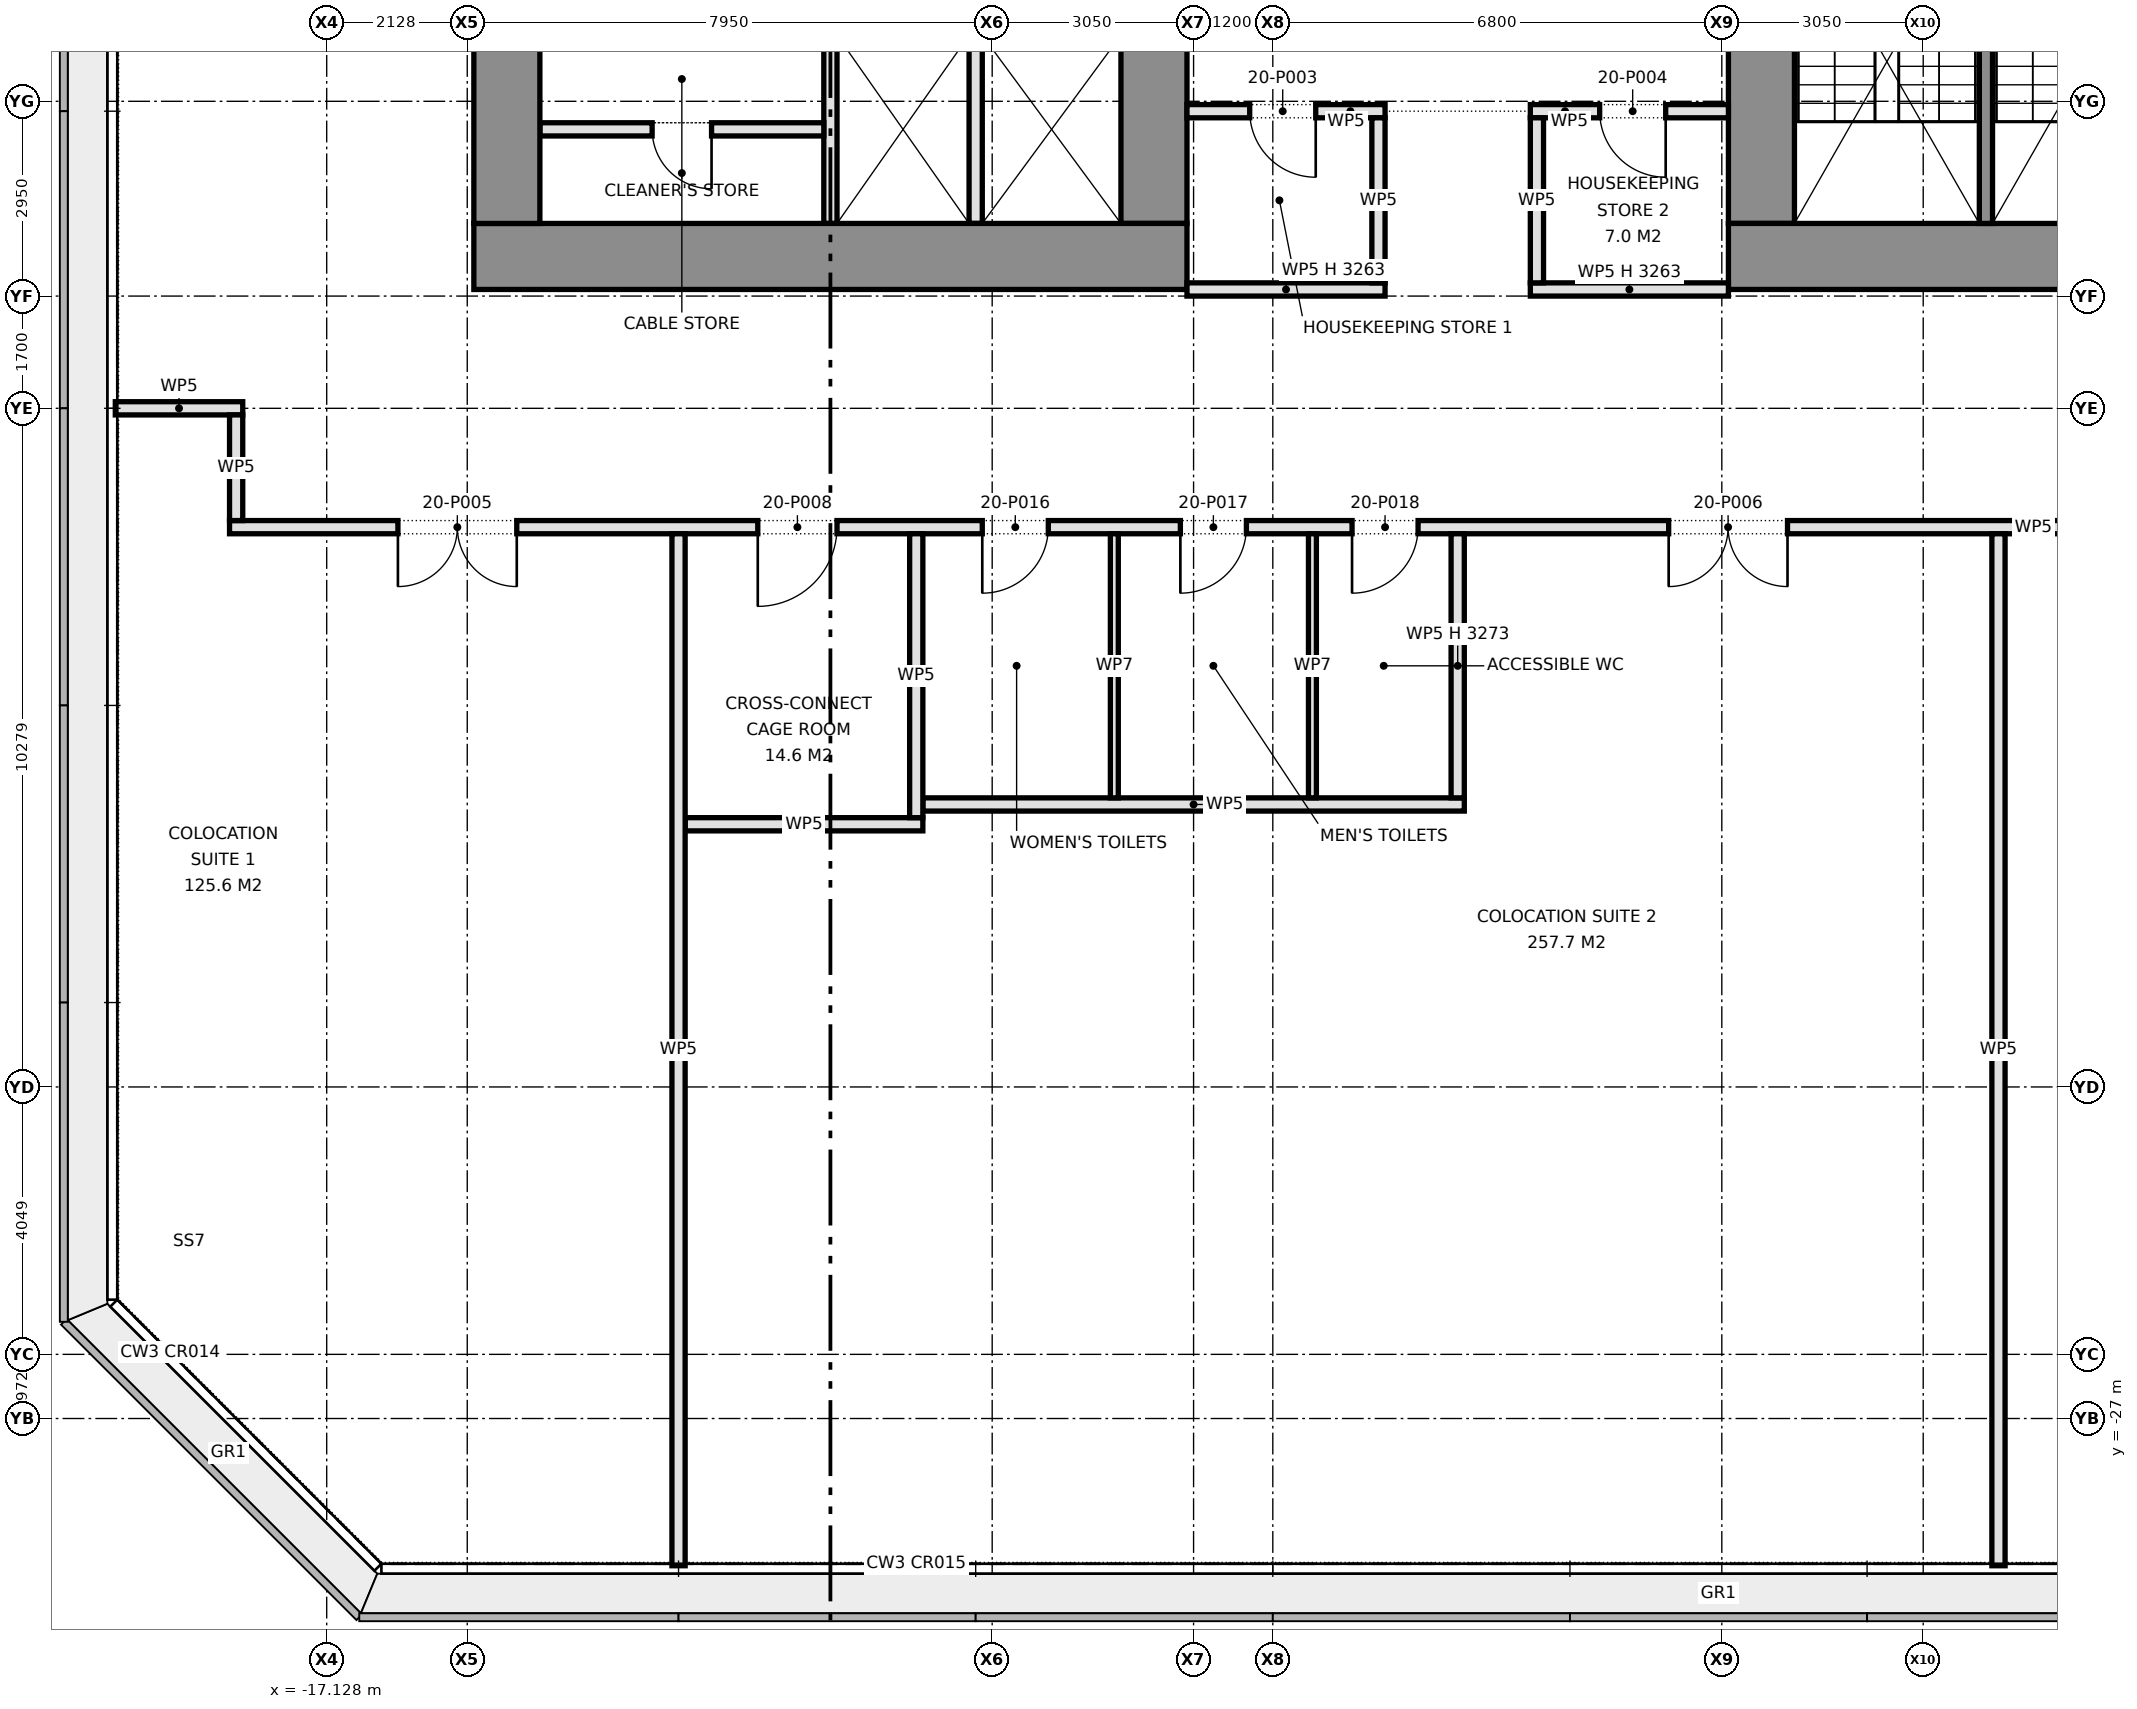
"""IFC4 building model, lengths in metres.
Left out: names, types, materials, properties, quantities, classifications, styles, units other than length and angle.
Written with IfcOpenShell. Run it as: python <this file> out.ifc"""

import sys

from ifc_helpers import new_model, si_unit, direction, frame, frame_2d, origin, place, context, subcontext, project, spatial, rectangle, extrude, element, fill, save


model = new_model("IFC4")
c1 = context("Model", 3, precision=1e-05, world=origin(), true_north=direction((0.0, 1.0)))
c2 = subcontext(c1, "Body", "Model", "MODEL_VIEW")
j1 = project(units=[si_unit("LENGTHUNIT", "METRE"), si_unit("PLANEANGLEUNIT", "RADIAN")], contexts=[c1])
p1 = place(None, origin())
s1 = spatial("IfcSite", under=j1, at=p1, CompositionType="ELEMENT")
p2 = place(p1, origin())
s2 = spatial("IfcBuilding", under=s1, at=p2, CompositionType="ELEMENT")
p3 = place(p2, frame((0.0, 0.0, 90.8)))
s3 = spatial("IfcBuildingStorey", under=s2, at=p3, CompositionType="ELEMENT", Elevation=90.8)
p4 = place(p3, frame((-14.9, -9.4, 0.0), z_axis=(0.0, 0.0, 1.0), x_axis=(1.0, 0.0, 0.0)))
e1 = element("IfcWall", 1, at=p4, inside=s3, PredefinedType="SHEAR", context=c2, shape_type="SweptSolid", body=[
    extrude(rectangle(XDim=10.8, YDim=1.0, at=frame_2d((5.4, 0.0))), origin(), (0.0, 0.0, 1.0), 4.2),
])
for number, where, z_axis, x_axis in (
    (2, (-14.4, -8.9, 0.0), (0.0, 0.0, 1.0), (0.0, 1.0, 0.0)),
    (3, (-4.6, -8.9, 0.0), (0.0, 0.0, 1.0), (0.0, 1.0, 0.0)),
):
    element("IfcWall", number, at=place(p3, frame(where, z_axis=z_axis, x_axis=x_axis)), inside=s3, PredefinedType="SHEAR", context=c2, shape_type="SweptSolid", body=[
        extrude(rectangle(XDim=3.15, YDim=1.0, at=frame_2d((1.575, 0.0))), origin(), (0.0, 0.0, 1.0), 4.2),
    ])
for number, where, z_axis, x_axis in (
    (4, (-9.5, -8.9, 0.0), (0.0, 0.0, 1.0), (0.0, 1.0, 0.0)),
    (5, (-7.3, -8.9, 0.0), (0.0, 0.0, 1.0), (0.0, 1.0, 0.0)),
):
    element("IfcWall", number, at=place(p3, frame(where, z_axis=z_axis, x_axis=x_axis)), inside=s3, PredefinedType="PARTITIONING", context=c2, shape_type="SweptSolid", body=[
        extrude(rectangle(XDim=2.85, YDim=0.2, at=frame_2d((1.425, 0.0))), origin(), (0.0, 0.0, 1.0), 4.2),
    ])
p5 = place(p3, frame((-13.9, -7.475, 0.0), z_axis=(0.0, 0.0, 1.0), x_axis=(1.0, 0.0, 0.0)))
e6 = element("IfcWall", 6, at=p5, inside=s3, PredefinedType="PARTITIONING", context=c2, shape_type="SweptSolid", body=[
    extrude(rectangle(XDim=4.3, YDim=0.2, at=frame_2d((2.15, 0.0))), origin(), (0.0, 0.0, 1.0), 4.2),
])
p6 = place(p5, frame((1.7, 0.0, 0.0)))
e7 = element("IfcOpeningElement", 7, at=p6, cuts=e6, PredefinedType="OPENING", context=c2, shape_type="SweptSolid", body=[
    extrude(rectangle(XDim=0.9, YDim=2.1, at=frame_2d((0.45, 1.05))), frame((0.0, 0.11, 0.0), z_axis=(0.0, -1.0, 0.0), x_axis=(1.0, 0.0, 0.0)), (0.0, 0.0, 1.0), 0.22),
])
p7 = place(p3, frame((14.9, -9.4, 0.0), z_axis=(0.0, 0.0, 1.0), x_axis=(-1.0, 0.0, 0.0)))
e8 = element("IfcWall", 8, at=p7, inside=s3, PredefinedType="SHEAR", context=c2, shape_type="SweptSolid", body=[
    extrude(rectangle(XDim=10.8, YDim=1.0, at=frame_2d((5.4, 0.0))), origin(), (0.0, 0.0, 1.0), 4.2),
])
p8 = place(p3, frame((4.6, -1.55, 0.0), z_axis=(0.0, 0.0, 1.0), x_axis=(0.0, -1.0, 0.0)))
e9 = element("IfcWall", 9, at=p8, inside=s3, PredefinedType="SHEAR", context=c2, shape_type="SweptSolid", body=[
    extrude(rectangle(XDim=7.35, YDim=1.0, at=frame_2d((3.675, 0.0))), origin(), (0.0, 0.0, 1.0), 4.2),
])
p9 = place(p3, frame((8.0, -2.38, 0.0), z_axis=(0.0, 0.0, 1.0), x_axis=(0.0, -1.0, 0.0)))
e10 = element("IfcWall", 10, at=p9, inside=s3, PredefinedType="SHEAR", context=c2, shape_type="SweptSolid", body=[
    extrude(rectangle(XDim=6.52, YDim=0.2, at=frame_2d((3.26, 0.0))), origin(), (0.0, 0.0, 1.0), 4.2),
])
p10 = place(p3, frame((-11.7, -18.0, 0.0), z_axis=(0.0, 0.0, 1.0), x_axis=(1.0, 0.0, 0.0)))
e11 = element("IfcWall", 11, at=p10, inside=s3, PredefinedType="PARTITIONING", context=c2, shape_type="SweptSolid", body=[
    extrude(rectangle(XDim=3.6, YDim=0.2, at=frame_2d((1.8, 0.0))), origin(), (0.0, 0.0, 1.0), 4.2),
])
p11 = place(p3, frame((-8.1, -17.7, 0.0), z_axis=(0.0, 0.0, 1.0), x_axis=(1.0, 0.0, 0.0)))
e12 = element("IfcWall", 12, at=p11, inside=s3, PredefinedType="PARTITIONING", context=c2, shape_type="SweptSolid", body=[
    extrude(rectangle(XDim=8.2, YDim=0.2, at=frame_2d((4.1, 0.0))), origin(), (0.0, 0.0, 1.0), 4.2),
])
p12 = place(p3, frame((-18.6, -13.5, 0.0), z_axis=(0.0, 0.0, 1.0), x_axis=(1.0, 0.0, 0.0)))
e13 = element("IfcWall", 13, at=p12, inside=s3, PredefinedType="PARTITIONING", context=c2, shape_type="SweptSolid", body=[
    extrude(rectangle(XDim=37.2, YDim=0.2, at=frame_2d((18.6, 0.0))), origin(), (0.0, 0.0, 1.0), 4.2),
])
p13 = place(p12, frame((2.55, 0.0, 0.0)))
e14 = element("IfcOpeningElement", 14, at=p13, cuts=e13, PredefinedType="OPENING", context=c2, shape_type="SweptSolid", body=[
    extrude(rectangle(XDim=1.8, YDim=2.1, at=frame_2d((0.9, 1.05))), frame((0.0, 0.11, 0.0), z_axis=(0.0, -1.0, 0.0), x_axis=(1.0, 0.0, 0.0)), (0.0, 0.0, 1.0), 0.22),
])
p14 = place(p12, frame((21.795, 0.0, 0.0)))
e15 = element("IfcOpeningElement", 15, at=p14, cuts=e13, PredefinedType="OPENING", context=c2, shape_type="SweptSolid", body=[
    extrude(rectangle(XDim=1.8, YDim=2.1, at=frame_2d((0.9, 1.05))), frame((0.0, 0.11, 0.0), z_axis=(0.0, -1.0, 0.0), x_axis=(1.0, 0.0, 0.0)), (0.0, 0.0, 1.0), 0.22),
])
p15 = place(p12, frame((31.045, 0.0, 0.0)))
e16 = element("IfcOpeningElement", 16, at=p15, cuts=e13, PredefinedType="OPENING", context=c2, shape_type="SweptSolid", body=[
    extrude(rectangle(XDim=1.8, YDim=2.1, at=frame_2d((0.9, 1.05))), frame((0.0, 0.11, 0.0), z_axis=(0.0, -1.0, 0.0), x_axis=(1.0, 0.0, 0.0)), (0.0, 0.0, 1.0), 0.22),
])
p16 = place(p12, frame((8.0, 0.0, 0.0)))
e17 = element("IfcOpeningElement", 17, at=p16, cuts=e13, PredefinedType="OPENING", context=c2, shape_type="SweptSolid", body=[
    extrude(rectangle(XDim=1.2, YDim=2.1, at=frame_2d((0.6, 1.05))), frame((0.0, 0.11, 0.0), z_axis=(0.0, -1.0, 0.0), x_axis=(1.0, 0.0, 0.0)), (0.0, 0.0, 1.0), 0.22),
])
p17 = place(p12, frame((11.4, 0.0, 0.0)))
e18 = element("IfcOpeningElement", 18, at=p17, cuts=e13, PredefinedType="OPENING", context=c2, shape_type="SweptSolid", body=[
    extrude(rectangle(XDim=1.0, YDim=2.1, at=frame_2d((0.5, 1.05))), frame((0.0, 0.11, 0.0), z_axis=(0.0, -1.0, 0.0), x_axis=(1.0, 0.0, 0.0)), (0.0, 0.0, 1.0), 0.22),
])
p18 = place(p12, frame((14.4, 0.0, 0.0)))
e19 = element("IfcOpeningElement", 19, at=p18, cuts=e13, PredefinedType="OPENING", context=c2, shape_type="SweptSolid", body=[
    extrude(rectangle(XDim=1.0, YDim=2.1, at=frame_2d((0.5, 1.05))), frame((0.0, 0.11, 0.0), z_axis=(0.0, -1.0, 0.0), x_axis=(1.0, 0.0, 0.0)), (0.0, 0.0, 1.0), 0.22),
])
p19 = place(p12, frame((17.0, 0.0, 0.0)))
e20 = element("IfcOpeningElement", 20, at=p19, cuts=e13, PredefinedType="OPENING", context=c2, shape_type="SweptSolid", body=[
    extrude(rectangle(XDim=1.0, YDim=2.1, at=frame_2d((0.5, 1.05))), frame((0.0, 0.11, 0.0), z_axis=(0.0, -1.0, 0.0), x_axis=(1.0, 0.0, 0.0)), (0.0, 0.0, 1.0), 0.22),
])
p20 = place(p3, frame((-20.33, -11.7, 0.0), z_axis=(0.0, 0.0, 1.0), x_axis=(1.0, 0.0, 0.0)))
e21 = element("IfcWall", 21, at=p20, inside=s3, PredefinedType="PARTITIONING", context=c2, shape_type="SweptSolid", body=[
    extrude(rectangle(XDim=1.93, YDim=0.2, at=frame_2d((0.965, 0.0))), origin(), (0.0, 0.0, 1.0), 4.2),
])
for number, where, z_axis, x_axis in (
    (22, (-4.1, -9.9, 0.0), (0.0, 0.0, 1.0), (1.0, 0.0, 0.0)),
    (23, (1.1, -9.9, 0.0), (0.0, 0.0, 1.0), (1.0, 0.0, 0.0)),
):
    element("IfcWall", number, at=place(p3, frame(where, z_axis=z_axis, x_axis=x_axis)), inside=s3, PredefinedType="PARTITIONING", context=c2, shape_type="SweptSolid", body=[
        extrude(rectangle(XDim=3.0, YDim=0.2, at=frame_2d((1.5, 0.0))), origin(), (0.0, 0.0, 1.0), 3.263),
    ])
p21 = place(p3, frame((-4.1, -7.2, 0.0), z_axis=(0.0, 0.0, 1.0), x_axis=(1.0, 0.0, 0.0)))
e24 = element("IfcWall", 24, at=p21, inside=s3, PredefinedType="PARTITIONING", context=c2, shape_type="SweptSolid", body=[
    extrude(rectangle(XDim=3.0, YDim=0.2, at=frame_2d((1.5, 0.0))), origin(), (0.0, 0.0, 1.0), 4.2),
])
p22 = place(p21, frame((0.95, 0.0, 0.0)))
e25 = element("IfcOpeningElement", 25, at=p22, cuts=e24, PredefinedType="OPENING", context=c2, shape_type="SweptSolid", body=[
    extrude(rectangle(XDim=1.0, YDim=2.1, at=frame_2d((0.5, 1.05))), frame((0.0, 0.11, 0.0), z_axis=(0.0, -1.0, 0.0), x_axis=(1.0, 0.0, 0.0)), (0.0, 0.0, 1.0), 0.22),
])
p23 = place(p3, frame((1.1, -7.2, 0.0), z_axis=(0.0, 0.0, 1.0), x_axis=(1.0, 0.0, 0.0)))
e26 = element("IfcWall", 26, at=p23, inside=s3, PredefinedType="PARTITIONING", context=c2, shape_type="SweptSolid", body=[
    extrude(rectangle(XDim=3.0, YDim=0.2, at=frame_2d((1.5, 0.0))), origin(), (0.0, 0.0, 1.0), 4.2),
])
p24 = place(p23, frame((1.05, 0.0, 0.0)))
e27 = element("IfcOpeningElement", 27, at=p24, cuts=e26, PredefinedType="OPENING", context=c2, shape_type="SweptSolid", body=[
    extrude(rectangle(XDim=1.0, YDim=2.1, at=frame_2d((0.5, 1.05))), frame((0.0, 0.11, 0.0), z_axis=(0.0, -1.0, 0.0), x_axis=(1.0, 0.0, 0.0)), (0.0, 0.0, 1.0), 0.22),
])
p25 = place(p3, frame((8.19, -29.23, 0.0), z_axis=(0.0, 0.0, 1.0), x_axis=(0.0, 1.0, 0.0)))
e28 = element("IfcWall", 28, at=p25, inside=s3, PredefinedType="PARTITIONING", context=c2, shape_type="SweptSolid", body=[
    extrude(rectangle(XDim=15.63, YDim=0.2, at=frame_2d((7.815, 0.0))), origin(), (0.0, 0.0, 1.0), 4.2),
])
p26 = place(p3, frame((1.2, -9.8, 0.0), z_axis=(0.0, 0.0, 1.0), x_axis=(0.0, 1.0, 0.0)))
e29 = element("IfcWall", 29, at=p26, inside=s3, PredefinedType="PARTITIONING", context=c2, shape_type="SweptSolid", body=[
    extrude(rectangle(XDim=2.5, YDim=0.2, at=frame_2d((1.25, 0.0))), origin(), (0.0, 0.0, 1.0), 4.2),
])
p27 = place(p3, frame((0.0, -17.6, 0.0), z_axis=(0.0, 0.0, 1.0), x_axis=(0.0, 1.0, 0.0)))
e30 = element("IfcWall", 30, at=p27, inside=s3, PredefinedType="PARTITIONING", context=c2, shape_type="SweptSolid", body=[
    extrude(rectangle(XDim=4.0, YDim=0.2, at=frame_2d((2.0, 0.0))), origin(), (0.0, 0.0, 1.0), 3.273),
])
p28 = place(p3, frame((-1.2, -9.8, 0.0), z_axis=(0.0, 0.0, 1.0), x_axis=(0.0, 1.0, 0.0)))
e31 = element("IfcWall", 31, at=p28, inside=s3, PredefinedType="PARTITIONING", context=c2, shape_type="SweptSolid", body=[
    extrude(rectangle(XDim=2.5, YDim=0.2, at=frame_2d((1.25, 0.0))), origin(), (0.0, 0.0, 1.0), 4.2),
])
p29 = place(p3, frame((-8.2, -17.9, 0.0), z_axis=(0.0, 0.0, 1.0), x_axis=(0.0, 1.0, 0.0)))
e32 = element("IfcWall", 32, at=p29, inside=s3, PredefinedType="PARTITIONING", context=c2, shape_type="SweptSolid", body=[
    extrude(rectangle(XDim=4.3, YDim=0.2, at=frame_2d((2.15, 0.0))), origin(), (0.0, 0.0, 1.0), 4.2),
])
p30 = place(p3, frame((-11.8, -29.23, 0.0), z_axis=(0.0, 0.0, 1.0), x_axis=(0.0, 1.0, 0.0)))
e33 = element("IfcWall", 33, at=p30, inside=s3, PredefinedType="PARTITIONING", context=c2, shape_type="SweptSolid", body=[
    extrude(rectangle(XDim=15.63, YDim=0.2, at=frame_2d((7.815, 0.0))), origin(), (0.0, 0.0, 1.0), 4.2),
])
p31 = place(p3, frame((-18.5, -13.4, 0.0), z_axis=(0.0, 0.0, 1.0), x_axis=(0.0, 1.0, 0.0)))
e34 = element("IfcWall", 34, at=p31, inside=s3, PredefinedType="PARTITIONING", context=c2, shape_type="SweptSolid", body=[
    extrude(rectangle(XDim=1.6, YDim=0.2, at=frame_2d((0.8, 0.0))), origin(), (0.0, 0.0, 1.0), 4.2),
])
for number, where, z_axis, x_axis in (
    (35, (-2.2, -17.6, 0.0), (0.0, 0.0, 1.0), (0.0, 1.0, 0.0)),
    (36, (-5.2, -17.6, 0.0), (0.0, 0.0, 1.0), (0.0, 1.0, 0.0)),
):
    element("IfcWall", number, at=place(p3, frame(where, z_axis=z_axis, x_axis=x_axis)), inside=s3, PredefinedType="PARTITIONING", context=c2, shape_type="SweptSolid", body=[
        extrude(rectangle(XDim=4.0, YDim=0.12, at=frame_2d((2.0, 0.0))), origin(), (0.0, 0.0, 1.0), 4.2),
    ])
p32 = place(p6, frame((0.9, 0.0, 0.0), z_axis=(0.0, 0.0, 1.0), x_axis=(-1.0, 0.0, 0.0)))
e37 = element("IfcDoor", 37, at=p32, inside=s3, OperationType="SINGLE_SWING_LEFT", PredefinedType="DOOR", context=c2, shape_type="SweptSolid", body=[
    extrude(rectangle(XDim=0.9, YDim=2.1, at=frame_2d((0.45, 1.05))), frame((0.0, 0.025, 0.0), z_axis=(0.0, -1.0, 0.0), x_axis=(1.0, 0.0, 0.0)), (0.0, 0.0, 1.0), 0.05),
])
fill(e7, e37)
p33 = place(p22, frame((1.0, 0.0, 0.0), z_axis=(0.0, 0.0, 1.0), x_axis=(-1.0, 0.0, 0.0)))
e38 = element("IfcDoor", 38, at=p33, inside=s3, OperationType="SINGLE_SWING_LEFT", PredefinedType="DOOR", context=c2, shape_type="SweptSolid", body=[
    extrude(rectangle(XDim=1.0, YDim=2.1, at=frame_2d((0.5, 1.05))), frame((0.0, 0.025, 0.0), z_axis=(0.0, -1.0, 0.0), x_axis=(1.0, 0.0, 0.0)), (0.0, 0.0, 1.0), 0.05),
])
fill(e25, e38)
p34 = place(p24, frame((1.0, 0.0, 0.0), z_axis=(0.0, 0.0, 1.0), x_axis=(-1.0, 0.0, 0.0)))
e39 = element("IfcDoor", 39, at=p34, inside=s3, OperationType="SINGLE_SWING_LEFT", PredefinedType="DOOR", context=c2, shape_type="SweptSolid", body=[
    extrude(rectangle(XDim=1.0, YDim=2.1, at=frame_2d((0.5, 1.05))), frame((0.0, 0.025, 0.0), z_axis=(0.0, -1.0, 0.0), x_axis=(1.0, 0.0, 0.0)), (0.0, 0.0, 1.0), 0.05),
])
fill(e27, e39)
p35 = place(p13, frame((1.8, 0.0, 0.0), z_axis=(0.0, 0.0, 1.0), x_axis=(-1.0, 0.0, 0.0)))
e40 = element("IfcDoor", 40, at=p35, inside=s3, OperationType="DOUBLE_DOOR_SINGLE_SWING", PredefinedType="DOOR", context=c2, shape_type="SweptSolid", body=[
    extrude(rectangle(XDim=1.8, YDim=2.1, at=frame_2d((0.9, 1.05))), frame((0.0, 0.025, 0.0), z_axis=(0.0, -1.0, 0.0), x_axis=(1.0, 0.0, 0.0)), (0.0, 0.0, 1.0), 0.05),
])
fill(e14, e40)
p36 = place(p14, frame((1.8, 0.0, 0.0), z_axis=(0.0, 0.0, 1.0), x_axis=(-1.0, 0.0, 0.0)))
e41 = element("IfcDoor", 41, at=p36, inside=s3, OperationType="DOUBLE_DOOR_SINGLE_SWING", PredefinedType="DOOR", context=c2, shape_type="SweptSolid", body=[
    extrude(rectangle(XDim=1.8, YDim=2.1, at=frame_2d((0.9, 1.05))), frame((0.0, 0.025, 0.0), z_axis=(0.0, -1.0, 0.0), x_axis=(1.0, 0.0, 0.0)), (0.0, 0.0, 1.0), 0.05),
])
fill(e15, e41)
p37 = place(p16, frame((1.2, 0.0, 0.0), z_axis=(0.0, 0.0, 1.0), x_axis=(-1.0, 0.0, 0.0)))
e42 = element("IfcDoor", 42, at=p37, inside=s3, OperationType="SINGLE_SWING_RIGHT", PredefinedType="DOOR", context=c2, shape_type="SweptSolid", body=[
    extrude(rectangle(XDim=1.2, YDim=2.1, at=frame_2d((0.6, 1.05))), frame((0.0, 0.025, 0.0), z_axis=(0.0, -1.0, 0.0), x_axis=(1.0, 0.0, 0.0)), (0.0, 0.0, 1.0), 0.05),
])
fill(e17, e42)
p38 = place(p17, frame((1.0, 0.0, 0.0), z_axis=(0.0, 0.0, 1.0), x_axis=(-1.0, 0.0, 0.0)))
e43 = element("IfcDoor", 43, at=p38, inside=s3, OperationType="SINGLE_SWING_RIGHT", PredefinedType="DOOR", context=c2, shape_type="SweptSolid", body=[
    extrude(rectangle(XDim=1.0, YDim=2.1, at=frame_2d((0.5, 1.05))), frame((0.0, 0.025, 0.0), z_axis=(0.0, -1.0, 0.0), x_axis=(1.0, 0.0, 0.0)), (0.0, 0.0, 1.0), 0.05),
])
fill(e18, e43)
p39 = place(p18, frame((1.0, 0.0, 0.0), z_axis=(0.0, 0.0, 1.0), x_axis=(-1.0, 0.0, 0.0)))
e44 = element("IfcDoor", 44, at=p39, inside=s3, OperationType="SINGLE_SWING_RIGHT", PredefinedType="DOOR", context=c2, shape_type="SweptSolid", body=[
    extrude(rectangle(XDim=1.0, YDim=2.1, at=frame_2d((0.5, 1.05))), frame((0.0, 0.025, 0.0), z_axis=(0.0, -1.0, 0.0), x_axis=(1.0, 0.0, 0.0)), (0.0, 0.0, 1.0), 0.05),
])
fill(e19, e44)
p40 = place(p19, frame((1.0, 0.0, 0.0), z_axis=(0.0, 0.0, 1.0), x_axis=(-1.0, 0.0, 0.0)))
e45 = element("IfcDoor", 45, at=p40, inside=s3, OperationType="SINGLE_SWING_RIGHT", PredefinedType="DOOR", context=c2, shape_type="SweptSolid", body=[
    extrude(rectangle(XDim=1.0, YDim=2.1, at=frame_2d((0.5, 1.05))), frame((0.0, 0.025, 0.0), z_axis=(0.0, -1.0, 0.0), x_axis=(1.0, 0.0, 0.0)), (0.0, 0.0, 1.0), 0.05),
])
fill(e20, e45)
save(model, sys.argv[1])
